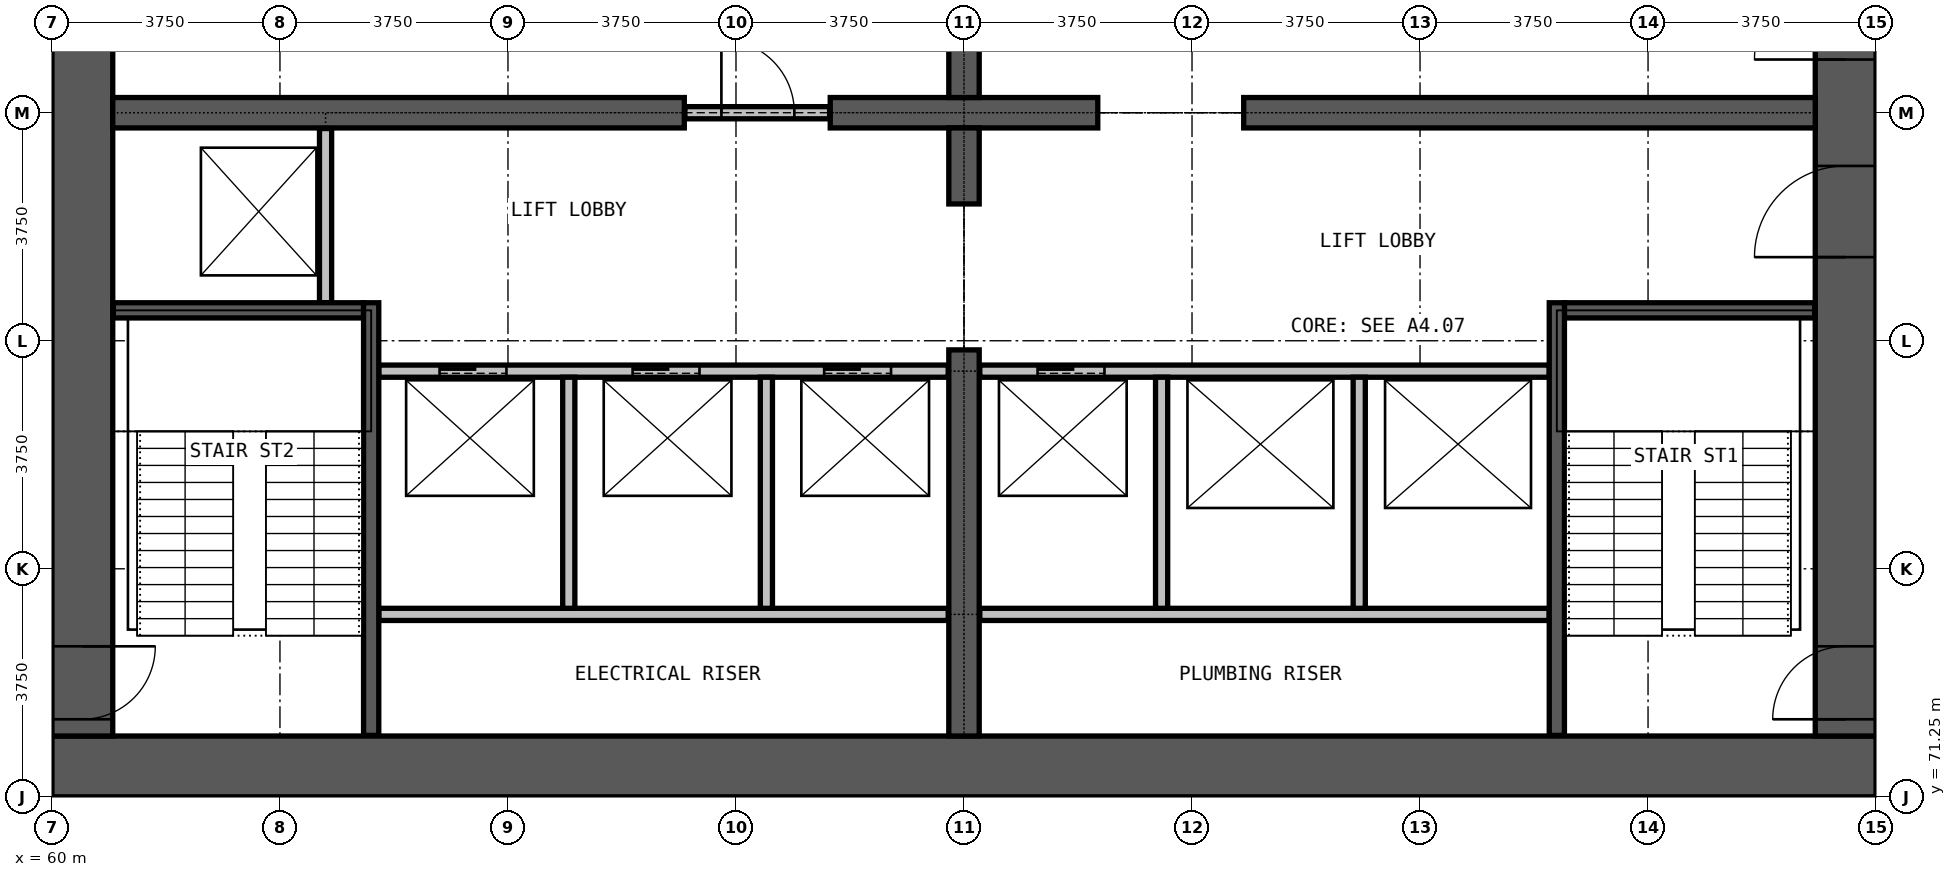
"""IFC4 building model, lengths in metres.
Left out: names, types, materials, properties, quantities, classifications, styles, units other than length and angle.
Written with IfcOpenShell. Run it as: python <this file> out.ifc"""

import sys

from ifc_helpers import new_model, si_unit, direction, frame, frame_2d, origin, place, context, subcontext, project, spatial, rectangle, extrude, element, fill, save


model = new_model("IFC4")
c1 = context("Model", 3, precision=1e-05, world=origin(), true_north=direction((0.0, 1.0)))
c2 = subcontext(c1, "Body", "Model", "MODEL_VIEW")
j1 = project(units=[si_unit("LENGTHUNIT", "METRE"), si_unit("PLANEANGLEUNIT", "RADIAN")], contexts=[c1])
p1 = place(None, origin())
s1 = spatial("IfcSite", under=j1, at=p1, CompositionType="ELEMENT")
p2 = place(p1, origin())
s2 = spatial("IfcBuilding", under=s1, at=p2, CompositionType="ELEMENT")
p3 = place(p2, frame((0.0, 0.0, 35.0)))
s3 = spatial("IfcBuildingStorey", under=s2, at=p3, CompositionType="ELEMENT", Elevation=35.0)
p4 = place(p3, frame((60.0, 71.75, 0.0), z_axis=(0.0, 0.0, 1.0), x_axis=(1.0, 0.0, 0.0)))
e1 = element("IfcWall", 1, at=p4, inside=s3, PredefinedType="SHEAR", context=c2, shape_type="SweptSolid", body=[
    extrude(rectangle(XDim=30.0, YDim=1.0, at=frame_2d((15.0, 0.0))), origin(), (0.0, 0.0, 1.0), 4.5),
])
p5 = place(p3, frame((89.5, 72.25, 0.0), z_axis=(0.0, 0.0, 1.0), x_axis=(0.0, 1.0, 0.0)))
e2 = element("IfcWall", 2, at=p5, inside=s3, PredefinedType="SHEAR", context=c2, shape_type="SweptSolid", body=[
    extrude(rectangle(XDim=20.5, YDim=1.0, at=frame_2d((10.25, 0.0))), origin(), (0.0, 0.0, 1.0), 4.5),
])
p6 = place(p5, frame((0.275, 0.0, 0.0)))
e3 = element("IfcOpeningElement", 3, at=p6, cuts=e2, PredefinedType="OPENING", context=c2, shape_type="SweptSolid", body=[
    extrude(rectangle(XDim=1.2, YDim=2.2, at=frame_2d((0.6, 1.1))), frame((0.0, 0.51, 0.0), z_axis=(0.0, -1.0, 0.0), x_axis=(1.0, 0.0, 0.0)), (0.0, 0.0, 1.0), 1.02),
])
p7 = place(p5, frame((13.775, 0.0, 0.0)))
e4 = element("IfcOpeningElement", 4, at=p7, cuts=e2, PredefinedType="OPENING", context=c2, shape_type="SweptSolid", body=[
    extrude(rectangle(XDim=1.2, YDim=2.2, at=frame_2d((0.6, 1.1))), frame((0.0, 0.51, 0.0), z_axis=(0.0, -1.0, 0.0), x_axis=(1.0, 0.0, 0.0)), (0.0, 0.0, 1.0), 1.02),
])
p8 = place(p5, frame((7.875, 0.0, 0.0)))
e5 = element("IfcOpeningElement", 5, at=p8, cuts=e2, PredefinedType="OPENING", context=c2, shape_type="SweptSolid", body=[
    extrude(rectangle(XDim=1.5, YDim=2.2, at=frame_2d((0.75, 1.1))), frame((0.0, 0.51, 0.0), z_axis=(0.0, -1.0, 0.0), x_axis=(1.0, 0.0, 0.0)), (0.0, 0.0, 1.0), 1.02),
])
p9 = place(p5, frame((11.125, 0.0, 0.0)))
e6 = element("IfcOpeningElement", 6, at=p9, cuts=e2, PredefinedType="OPENING", context=c2, shape_type="SweptSolid", body=[
    extrude(rectangle(XDim=1.5, YDim=2.2, at=frame_2d((0.75, 1.1))), frame((0.0, 0.51, 0.0), z_axis=(0.0, -1.0, 0.0), x_axis=(1.0, 0.0, 0.0)), (0.0, 0.0, 1.0), 1.02),
])
p10 = place(p3, frame((60.5, 92.75, 0.0), z_axis=(0.0, 0.0, 1.0), x_axis=(0.0, -1.0, 0.0)))
e7 = element("IfcWall", 7, at=p10, inside=s3, PredefinedType="SHEAR", context=c2, shape_type="SweptSolid", body=[
    extrude(rectangle(XDim=20.5, YDim=1.0, at=frame_2d((10.25, 0.0))), origin(), (0.0, 0.0, 1.0), 4.5),
])
p11 = place(p10, frame((19.025, 0.0, 0.0)))
e8 = element("IfcOpeningElement", 8, at=p11, cuts=e7, PredefinedType="OPENING", context=c2, shape_type="SweptSolid", body=[
    extrude(rectangle(XDim=1.2, YDim=2.2, at=frame_2d((0.6, 1.1))), frame((0.0, 0.51, 0.0), z_axis=(0.0, -1.0, 0.0), x_axis=(1.0, 0.0, 0.0)), (0.0, 0.0, 1.0), 1.02),
])
p12 = place(p10, frame((8.025, 0.0, 0.0)))
e9 = element("IfcOpeningElement", 9, at=p12, cuts=e7, PredefinedType="OPENING", context=c2, shape_type="SweptSolid", body=[
    extrude(rectangle(XDim=1.2, YDim=2.2, at=frame_2d((0.6, 1.1))), frame((0.0, 0.51, 0.0), z_axis=(0.0, -1.0, 0.0), x_axis=(1.0, 0.0, 0.0)), (0.0, 0.0, 1.0), 1.02),
])
p13 = place(p3, frame((61.0, 82.5, 0.0), z_axis=(0.0, 0.0, 1.0), x_axis=(1.0, 0.0, 0.0)))
e10 = element("IfcWall", 10, at=p13, inside=s3, PredefinedType="SHEAR", context=c2, shape_type="SweptSolid", body=[
    extrude(rectangle(XDim=9.4, YDim=0.5, at=frame_2d((4.7, 0.0))), origin(), (0.0, 0.0, 1.0), 4.5),
])
p14 = place(p3, frame((72.8, 82.5, 0.0), z_axis=(0.0, 0.0, 1.0), x_axis=(1.0, 0.0, 0.0)))
e11 = element("IfcWall", 11, at=p14, inside=s3, PredefinedType="SHEAR", context=c2, shape_type="SweptSolid", body=[
    extrude(rectangle(XDim=4.4, YDim=0.5, at=frame_2d((2.2, 0.0))), origin(), (0.0, 0.0, 1.0), 4.5),
])
p15 = place(p3, frame((79.6, 82.5, 0.0), z_axis=(0.0, 0.0, 1.0), x_axis=(1.0, 0.0, 0.0)))
e12 = element("IfcWall", 12, at=p15, inside=s3, PredefinedType="SHEAR", context=c2, shape_type="SweptSolid", body=[
    extrude(rectangle(XDim=9.4, YDim=0.5, at=frame_2d((4.7, 0.0))), origin(), (0.0, 0.0, 1.0), 4.5),
])
p16 = place(p3, frame((75.0, 72.25, 0.0), z_axis=(0.0, 0.0, 1.0), x_axis=(0.0, 1.0, 0.0)))
e13 = element("IfcWall", 13, at=p16, inside=s3, PredefinedType="SHEAR", context=c2, shape_type="SweptSolid", body=[
    extrude(rectangle(XDim=6.35, YDim=0.5, at=frame_2d((3.175, 0.0))), origin(), (0.0, 0.0, 1.0), 4.5),
])
for number, where, z_axis, x_axis in (
    (14, (75.0, 81.0, 0.0), (0.0, 0.0, 1.0), (0.0, 1.0, 0.0)),
    (15, (75.0, 82.75, 0.0), (0.0, 0.0, 1.0), (0.0, 1.0, 0.0)),
):
    element("IfcWall", number, at=place(p3, frame(where, z_axis=z_axis, x_axis=x_axis)), inside=s3, PredefinedType="SHEAR", context=c2, shape_type="SweptSolid", body=[
        extrude(rectangle(XDim=1.25, YDim=0.5, at=frame_2d((0.625, 0.0))), origin(), (0.0, 0.0, 1.0), 4.5),
    ])
p17 = place(p3, frame((70.41, 82.5, 0.0), z_axis=(0.0, 0.0, 1.0), x_axis=(1.0, 0.0, 0.0)))
e16 = element("IfcWall", 16, at=p17, inside=s3, PredefinedType="PARTITIONING", context=c2, shape_type="SweptSolid", body=[
    extrude(rectangle(XDim=2.38, YDim=0.2, at=frame_2d((1.19, 0.0))), origin(), (0.0, 0.0, 1.0), 2.4),
])
p18 = place(p17, frame((0.6, 0.0, 0.0)))
e17 = element("IfcOpeningElement", 17, at=p18, cuts=e16, PredefinedType="OPENING", context=c2, shape_type="SweptSolid", body=[
    extrude(rectangle(XDim=1.2, YDim=2.2, at=frame_2d((0.6, 1.1))), frame((0.0, 0.11, 0.0), z_axis=(0.0, -1.0, 0.0), x_axis=(1.0, 0.0, 0.0)), (0.0, 0.0, 1.0), 0.22),
])
for number, where, z_axis, x_axis in (
    (18, (65.375, 74.25, 0.0), (0.0, 0.0, 1.0), (1.0, 0.0, 0.0)),
    (19, (75.26, 74.25, 0.0), (0.0, 0.0, 1.0), (1.0, 0.0, 0.0)),
):
    element("IfcWall", number, at=place(p3, frame(where, z_axis=z_axis, x_axis=x_axis)), inside=s3, PredefinedType="PARTITIONING", context=c2, shape_type="SweptSolid", body=[
        extrude(rectangle(XDim=9.365, YDim=0.2, at=frame_2d((4.683, 0.0))), origin(), (0.0, 0.0, 1.0), 4.2),
    ])
p19 = place(p3, frame((65.375, 78.25, 0.0), z_axis=(0.0, 0.0, 1.0), x_axis=(1.0, 0.0, 0.0)))
e20 = element("IfcWall", 20, at=p19, inside=s3, PredefinedType="PARTITIONING", context=c2, shape_type="SweptSolid", body=[
    extrude(rectangle(XDim=9.365, YDim=0.2, at=frame_2d((4.683, 0.0))), origin(), (0.0, 0.0, 1.0), 4.2),
])
p20 = place(p19, frame((1.0, 0.0, 0.0)))
e21 = element("IfcOpeningElement", 21, at=p20, cuts=e20, PredefinedType="OPENING", context=c2, shape_type="SweptSolid", body=[
    extrude(rectangle(XDim=1.1, YDim=2.2, at=frame_2d((0.55, 1.1))), frame((0.0, 0.11, 0.0), z_axis=(0.0, -1.0, 0.0), x_axis=(1.0, 0.0, 0.0)), (0.0, 0.0, 1.0), 0.22),
])
p21 = place(p19, frame((4.175, 0.0, 0.0)))
e22 = element("IfcOpeningElement", 22, at=p21, cuts=e20, PredefinedType="OPENING", context=c2, shape_type="SweptSolid", body=[
    extrude(rectangle(XDim=1.1, YDim=2.2, at=frame_2d((0.55, 1.1))), frame((0.0, 0.11, 0.0), z_axis=(0.0, -1.0, 0.0), x_axis=(1.0, 0.0, 0.0)), (0.0, 0.0, 1.0), 0.22),
])
p22 = place(p19, frame((7.325, 0.0, 0.0)))
e23 = element("IfcOpeningElement", 23, at=p22, cuts=e20, PredefinedType="OPENING", context=c2, shape_type="SweptSolid", body=[
    extrude(rectangle(XDim=1.1, YDim=2.2, at=frame_2d((0.55, 1.1))), frame((0.0, 0.11, 0.0), z_axis=(0.0, -1.0, 0.0), x_axis=(1.0, 0.0, 0.0)), (0.0, 0.0, 1.0), 0.22),
])
p23 = place(p3, frame((75.26, 78.25, 0.0), z_axis=(0.0, 0.0, 1.0), x_axis=(1.0, 0.0, 0.0)))
e24 = element("IfcWall", 24, at=p23, inside=s3, PredefinedType="PARTITIONING", context=c2, shape_type="SweptSolid", body=[
    extrude(rectangle(XDim=9.365, YDim=0.2, at=frame_2d((4.683, 0.0))), origin(), (0.0, 0.0, 1.0), 4.2),
])
p24 = place(p23, frame((0.95, 0.0, 0.0)))
e25 = element("IfcOpeningElement", 25, at=p24, cuts=e24, PredefinedType="OPENING", context=c2, shape_type="SweptSolid", body=[
    extrude(rectangle(XDim=1.1, YDim=2.2, at=frame_2d((0.55, 1.1))), frame((0.0, 0.11, 0.0), z_axis=(0.0, -1.0, 0.0), x_axis=(1.0, 0.0, 0.0)), (0.0, 0.0, 1.0), 0.22),
])
p25 = place(p3, frame((64.5, 79.375, 0.0), z_axis=(0.0, 0.0, 1.0), x_axis=(0.0, 1.0, 0.0)))
e26 = element("IfcWall", 26, at=p25, inside=s3, PredefinedType="PARTITIONING", context=c2, shape_type="SweptSolid", body=[
    extrude(rectangle(XDim=2.865, YDim=0.2, at=frame_2d((1.433, 0.0))), origin(), (0.0, 0.0, 1.0), 4.2),
])
for number, where, z_axis, x_axis in (
    (27, (68.5, 74.35, 0.0), (0.0, 0.0, 1.0), (0.0, 1.0, 0.0)),
    (28, (71.75, 74.35, 0.0), (0.0, 0.0, 1.0), (0.0, 1.0, 0.0)),
    (29, (78.25, 74.35, 0.0), (0.0, 0.0, 1.0), (0.0, 1.0, 0.0)),
    (30, (81.5, 74.35, 0.0), (0.0, 0.0, 1.0), (0.0, 1.0, 0.0)),
):
    element("IfcWall", number, at=place(p3, frame(where, z_axis=z_axis, x_axis=x_axis)), inside=s3, PredefinedType="PARTITIONING", context=c2, shape_type="SweptSolid", body=[
        extrude(rectangle(XDim=3.8, YDim=0.2, at=frame_2d((1.9, 0.0))), origin(), (0.0, 0.0, 1.0), 4.2),
    ])
for number, where, z_axis, x_axis in (
    (31, (61.01, 79.25, 0.0), (0.0, 0.0, 1.0), (1.0, 0.0, 0.0)),
    (32, (84.875, 79.25, 0.0), (0.0, 0.0, 1.0), (1.0, 0.0, 0.0)),
):
    element("IfcWall", number, at=place(p3, frame(where, z_axis=z_axis, x_axis=x_axis)), inside=s3, PredefinedType="PARTITIONING", context=c2, shape_type="SweptSolid", body=[
        extrude(rectangle(XDim=4.115, YDim=0.25, at=frame_2d((2.058, 0.0))), origin(), (0.0, 0.0, 1.0), 4.2),
    ])
for number, where, z_axis, x_axis in (
    (33, (65.25, 72.26, 0.0), (0.0, 0.0, 1.0), (0.0, 1.0, 0.0)),
    (34, (84.75, 72.26, 0.0), (0.0, 0.0, 1.0), (0.0, 1.0, 0.0)),
):
    element("IfcWall", number, at=place(p3, frame(where, z_axis=z_axis, x_axis=x_axis)), inside=s3, PredefinedType="PARTITIONING", context=c2, shape_type="SweptSolid", body=[
        extrude(rectangle(XDim=7.115, YDim=0.25, at=frame_2d((3.558, 0.0))), origin(), (0.0, 0.0, 1.0), 4.2),
    ])
p26 = place(p20, origin())
e35 = element("IfcDoor", 35, at=p26, inside=s3, OperationType="DOUBLE_DOOR_SLIDING", PredefinedType="DOOR", context=c2, shape_type="SweptSolid", body=[
    extrude(rectangle(XDim=1.1, YDim=2.2, at=frame_2d((0.55, 1.1))), frame((0.0, 0.025, 0.0), z_axis=(0.0, -1.0, 0.0), x_axis=(1.0, 0.0, 0.0)), (0.0, 0.0, 1.0), 0.05),
])
fill(e21, e35)
p27 = place(p21, origin())
e36 = element("IfcDoor", 36, at=p27, inside=s3, OperationType="DOUBLE_DOOR_SLIDING", PredefinedType="DOOR", context=c2, shape_type="SweptSolid", body=[
    extrude(rectangle(XDim=1.1, YDim=2.2, at=frame_2d((0.55, 1.1))), frame((0.0, 0.025, 0.0), z_axis=(0.0, -1.0, 0.0), x_axis=(1.0, 0.0, 0.0)), (0.0, 0.0, 1.0), 0.05),
])
fill(e22, e36)
p28 = place(p22, origin())
e37 = element("IfcDoor", 37, at=p28, inside=s3, OperationType="DOUBLE_DOOR_SLIDING", PredefinedType="DOOR", context=c2, shape_type="SweptSolid", body=[
    extrude(rectangle(XDim=1.1, YDim=2.2, at=frame_2d((0.55, 1.1))), frame((0.0, 0.025, 0.0), z_axis=(0.0, -1.0, 0.0), x_axis=(1.0, 0.0, 0.0)), (0.0, 0.0, 1.0), 0.05),
])
fill(e23, e37)
p29 = place(p24, origin())
e38 = element("IfcDoor", 38, at=p29, inside=s3, OperationType="DOUBLE_DOOR_SLIDING", PredefinedType="DOOR", context=c2, shape_type="SweptSolid", body=[
    extrude(rectangle(XDim=1.1, YDim=2.2, at=frame_2d((0.55, 1.1))), frame((0.0, 0.025, 0.0), z_axis=(0.0, -1.0, 0.0), x_axis=(1.0, 0.0, 0.0)), (0.0, 0.0, 1.0), 0.05),
])
fill(e25, e38)
p30 = place(p18, origin())
e39 = element("IfcDoor", 39, at=p30, inside=s3, OperationType="SINGLE_SWING_LEFT", PredefinedType="DOOR", context=c2, shape_type="SweptSolid", body=[
    extrude(rectangle(XDim=1.2, YDim=2.2, at=frame_2d((0.6, 1.1))), frame((0.0, 0.025, 0.0), z_axis=(0.0, -1.0, 0.0), x_axis=(1.0, 0.0, 0.0)), (0.0, 0.0, 1.0), 0.05),
])
fill(e17, e39)
p31 = place(p6, origin())
e40 = element("IfcDoor", 40, at=p31, inside=s3, OperationType="SINGLE_SWING_LEFT", PredefinedType="DOOR", context=c2, shape_type="SweptSolid", body=[
    extrude(rectangle(XDim=1.2, YDim=2.2, at=frame_2d((0.6, 1.1))), frame((0.0, 0.025, 0.0), z_axis=(0.0, -1.0, 0.0), x_axis=(1.0, 0.0, 0.0)), (0.0, 0.0, 1.0), 0.05),
])
fill(e3, e40)
p32 = place(p11, origin())
e41 = element("IfcDoor", 41, at=p32, inside=s3, OperationType="SINGLE_SWING_RIGHT", PredefinedType="DOOR", context=c2, shape_type="SweptSolid", body=[
    extrude(rectangle(XDim=1.2, YDim=2.2, at=frame_2d((0.6, 1.1))), frame((0.0, 0.025, 0.0), z_axis=(0.0, -1.0, 0.0), x_axis=(1.0, 0.0, 0.0)), (0.0, 0.0, 1.0), 0.05),
])
fill(e8, e41)
p33 = place(p8, origin())
e42 = element("IfcDoor", 42, at=p33, inside=s3, OperationType="DOUBLE_DOOR_SINGLE_SWING", PredefinedType="DOOR", context=c2, shape_type="SweptSolid", body=[
    extrude(rectangle(XDim=1.5, YDim=2.2, at=frame_2d((0.75, 1.1))), frame((0.0, 0.025, 0.0), z_axis=(0.0, -1.0, 0.0), x_axis=(1.0, 0.0, 0.0)), (0.0, 0.0, 1.0), 0.05),
])
fill(e5, e42)
p34 = place(p9, origin())
e43 = element("IfcDoor", 43, at=p34, inside=s3, OperationType="DOUBLE_DOOR_SINGLE_SWING", PredefinedType="DOOR", context=c2, shape_type="SweptSolid", body=[
    extrude(rectangle(XDim=1.5, YDim=2.2, at=frame_2d((0.75, 1.1))), frame((0.0, 0.025, 0.0), z_axis=(0.0, -1.0, 0.0), x_axis=(1.0, 0.0, 0.0)), (0.0, 0.0, 1.0), 0.05),
])
fill(e6, e43)
save(model, sys.argv[1])
